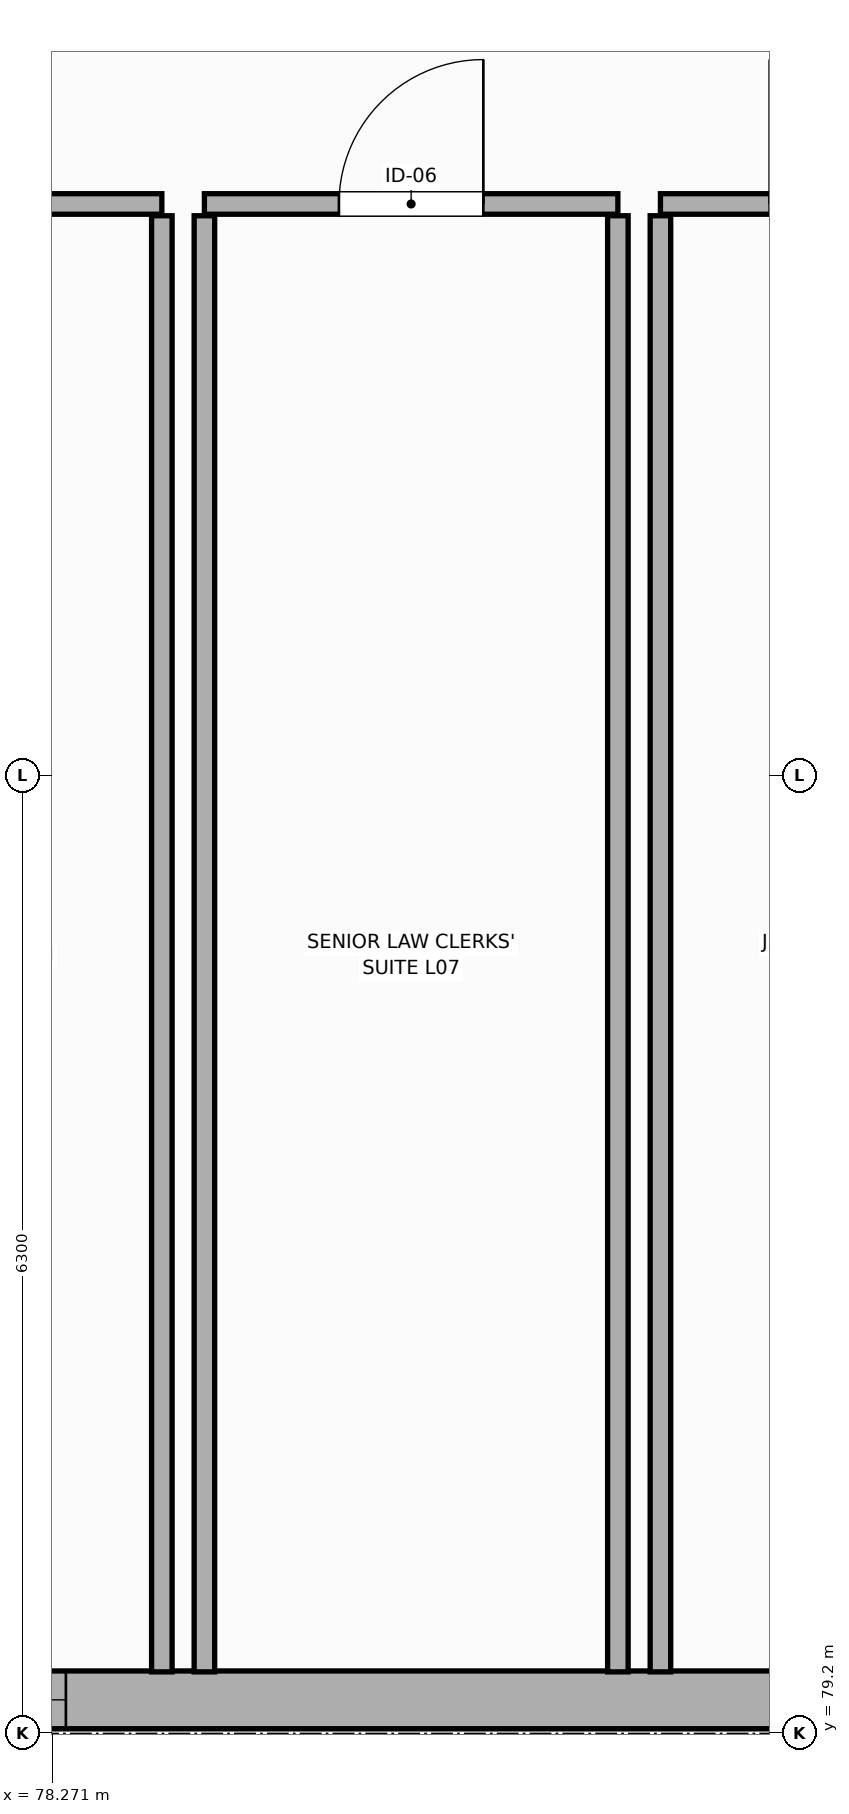
"""IFC4 building model, lengths in metres.
Left out: names, types, materials, properties, quantities, classifications, styles, units other than length and angle.
Written with IfcOpenShell. Run it as: python <this file> out.ifc"""

import sys

from ifc_helpers import new_model, si_unit, direction, frame, frame_2d, origin, place, context, subcontext, project, spatial, rectangle, extrude, element, fill, save


model = new_model("IFC4")
c1 = context("Model", 3, precision=1e-05, world=origin(), true_north=direction((0.0, 1.0)))
c2 = subcontext(c1, "Body", "Model", "MODEL_VIEW")
j1 = project(units=[si_unit("LENGTHUNIT", "METRE"), si_unit("PLANEANGLEUNIT", "RADIAN")], contexts=[c1])
p1 = place(None, origin())
s1 = spatial("IfcSite", under=j1, at=p1, CompositionType="ELEMENT")
p2 = place(p1, origin())
s2 = spatial("IfcBuilding", under=s1, at=p2, CompositionType="ELEMENT")
p3 = place(p2, frame((0.0, 0.0, 27.0)))
s3 = spatial("IfcBuildingStorey", under=s2, at=p3, CompositionType="ELEMENT", Elevation=27.0)
p4 = place(p3, frame((83.758, 79.42, 0.0), z_axis=(0.0, 0.0, 1.0), x_axis=(-1.0, 0.0, 0.0)))
e1 = element("IfcWall", 1, at=p4, inside=s3, PredefinedType="STANDARD", context=c2, shape_type="SweptSolid", body=[
    extrude(rectangle(XDim=7.916, YDim=0.38, at=frame_2d((3.958, 0.0))), origin(), (0.0, 0.0, 1.0), 3.51),
])
p5 = place(p4, frame((5.396, 0.0, 0.85)))
e2 = element("IfcOpeningElement", 2, at=p5, cuts=e1, PredefinedType="OPENING", context=c2, shape_type="SweptSolid", body=[
    extrude(rectangle(XDim=1.35, YDim=1.95, at=frame_2d((0.675, 0.975))), frame((0.0, 0.2, 0.0), z_axis=(0.0, -1.0, 0.0), x_axis=(1.0, 0.0, 0.0)), (0.0, 0.0, 1.0), 0.4),
])
p6 = place(p3, frame((74.94, 89.26, 0.0), z_axis=(0.0, 0.0, 1.0), x_axis=(1.0, 0.0, 0.0)))
e3 = element("IfcWall", 3, at=p6, inside=s3, PredefinedType="PARTITIONING", context=c2, shape_type="SweptSolid", body=[
    extrude(rectangle(XDim=4.053, YDim=0.135, at=frame_2d((2.026, 0.0))), origin(), (0.0, 0.0, 1.0), 3.51),
])
p7 = place(p6, frame((1.517, 0.0, 0.0)))
e4 = element("IfcOpeningElement", 4, at=p7, cuts=e3, PredefinedType="OPENING", context=c2, shape_type="SweptSolid", body=[
    extrude(rectangle(XDim=1.02, YDim=2.15, at=frame_2d((0.51, 1.075))), frame((0.0, 0.077, 0.0), z_axis=(0.0, -1.0, 0.0), x_axis=(1.0, 0.0, 0.0)), (0.0, 0.0, 1.0), 0.155),
])
p8 = place(p3, frame((78.993, 89.183, 0.0), z_axis=(0.0, 0.0, 1.0), x_axis=(0.0, -1.0, 0.0)))
e5 = element("IfcWall", 5, at=p8, inside=s3, PredefinedType="PARTITIONING", context=c2, shape_type="SweptSolid", body=[
    extrude(rectangle(XDim=9.579, YDim=0.135, at=frame_2d((4.789, 0.0))), origin(), (0.0, 0.0, 1.0), 3.41),
])
p9 = place(p3, frame((79.273, 89.26, 0.0), z_axis=(0.0, 0.0, 1.0), x_axis=(1.0, 0.0, 0.0)))
e6 = element("IfcWall", 6, at=p9, inside=s3, PredefinedType="PARTITIONING", context=c2, shape_type="SweptSolid", body=[
    extrude(rectangle(XDim=2.72, YDim=0.135, at=frame_2d((1.36, 0.0))), origin(), (0.0, 0.0, 1.0), 3.965),
])
p10 = place(p9, frame((0.885, 0.0, 0.0)))
e7 = element("IfcOpeningElement", 7, at=p10, cuts=e6, PredefinedType="OPENING", context=c2, shape_type="SweptSolid", body=[
    extrude(rectangle(XDim=0.95, YDim=2.15, at=frame_2d((0.475, 1.075))), frame((0.0, 0.077, 0.0), z_axis=(0.0, -1.0, 0.0), x_axis=(1.0, 0.0, 0.0)), (0.0, 0.0, 1.0), 0.155),
])
for number, where, z_axis, x_axis in (
    (8, (79.273, 79.604, 0.0), (0.0, 0.0, 1.0), (0.0, 1.0, 0.0)),
    (9, (81.993, 89.183, 0.0), (0.0, 0.0, 1.0), (0.0, -1.0, 0.0)),
):
    element("IfcWall", number, at=place(p3, frame(where, z_axis=z_axis, x_axis=x_axis)), inside=s3, PredefinedType="PARTITIONING", context=c2, shape_type="SweptSolid", body=[
        extrude(rectangle(XDim=9.579, YDim=0.135, at=frame_2d((4.789, 0.0))), origin(), (0.0, 0.0, 1.0), 3.41),
    ])
p11 = place(p3, frame((82.273, 89.26, 0.0), z_axis=(0.0, 0.0, 1.0), x_axis=(1.0, 0.0, 0.0)))
e10 = element("IfcWall", 10, at=p11, inside=s3, PredefinedType="PARTITIONING", context=c2, shape_type="SweptSolid", body=[
    extrude(rectangle(XDim=2.387, YDim=0.135, at=frame_2d((1.193, 0.0))), origin(), (0.0, 0.0, 1.0), 3.51),
])
p12 = place(p11, frame((0.719, 0.0, 0.0)))
e11 = element("IfcOpeningElement", 11, at=p12, cuts=e10, PredefinedType="OPENING", context=c2, shape_type="SweptSolid", body=[
    extrude(rectangle(XDim=0.95, YDim=2.15, at=frame_2d((0.475, 1.075))), frame((0.0, 0.077, 0.0), z_axis=(0.0, -1.0, 0.0), x_axis=(1.0, 0.0, 0.0)), (0.0, 0.0, 1.0), 0.155),
])
p13 = place(p3, frame((82.273, 79.604, 0.0), z_axis=(0.0, 0.0, 1.0), x_axis=(0.0, 1.0, 0.0)))
e12 = element("IfcWall", 12, at=p13, inside=s3, PredefinedType="PARTITIONING", context=c2, shape_type="SweptSolid", body=[
    extrude(rectangle(XDim=9.579, YDim=0.135, at=frame_2d((4.789, 0.0))), origin(), (0.0, 0.0, 1.0), 3.41),
])
p14 = place(p5, origin())
e13 = element("IfcWindow", 13, at=p14, inside=s3, PartitioningType="SINGLE_PANEL", PredefinedType="WINDOW", context=c2, shape_type="SweptSolid", body=[
    extrude(rectangle(XDim=1.35, YDim=1.95, at=frame_2d((0.675, 0.975))), frame((0.0, 0.03, 0.0), z_axis=(0.0, -1.0, 0.0), x_axis=(1.0, 0.0, 0.0)), (0.0, 0.0, 1.0), 0.06),
])
fill(e2, e13)
p15 = place(p10, origin())
e14 = element("IfcDoor", 14, at=p15, inside=s3, OperationType="SINGLE_SWING_RIGHT", PredefinedType="DOOR", context=c2, shape_type="SweptSolid", body=[
    extrude(rectangle(XDim=0.95, YDim=2.15, at=frame_2d((0.475, 1.075))), frame((0.0, 0.025, 0.0), z_axis=(0.0, -1.0, 0.0), x_axis=(1.0, 0.0, 0.0)), (0.0, 0.0, 1.0), 0.05),
])
fill(e7, e14)
p16 = place(p12, origin())
e15 = element("IfcDoor", 15, at=p16, inside=s3, OperationType="SINGLE_SWING_LEFT", PredefinedType="DOOR", context=c2, shape_type="SweptSolid", body=[
    extrude(rectangle(XDim=0.95, YDim=2.15, at=frame_2d((0.475, 1.075))), frame((0.0, 0.025, 0.0), z_axis=(0.0, -1.0, 0.0), x_axis=(1.0, 0.0, 0.0)), (0.0, 0.0, 1.0), 0.05),
])
fill(e11, e15)
save(model, sys.argv[1])
